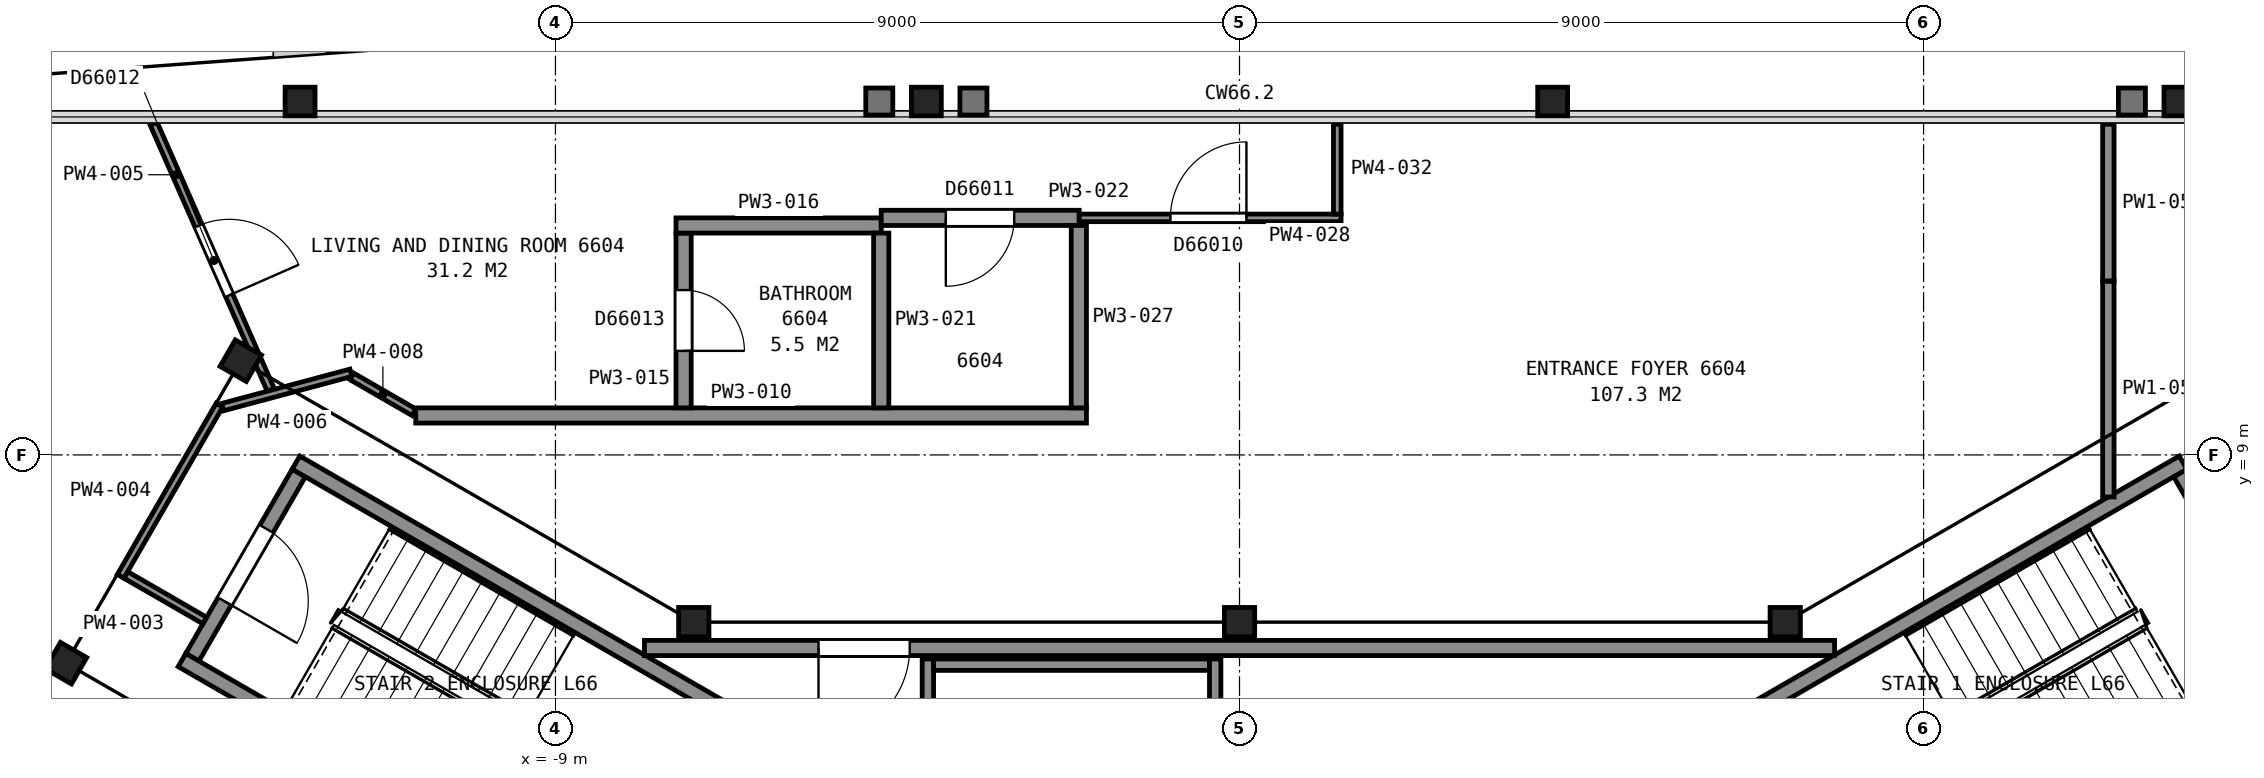
"""IFC4 building model, lengths in metres.
Left out: names, types, materials, properties, quantities, classifications, styles, units other than length and angle.
Written with IfcOpenShell. Run it as: python <this file> out.ifc"""

import sys

from ifc_helpers import new_model, si_unit, direction, frame, frame_2d, origin, origin_2d, place, context, subcontext, project, spatial, rectangle, i_section, extrude, element, fill, save


model = new_model("IFC4")
c1 = context("Model", 3, precision=1e-05, world=origin(), true_north=direction((0.0, 1.0)))
c2 = subcontext(c1, "Body", "Model", "MODEL_VIEW")
j1 = project(units=[si_unit("LENGTHUNIT", "METRE"), si_unit("PLANEANGLEUNIT", "RADIAN")], contexts=[c1])
p1 = place(None, origin())
s1 = spatial("IfcSite", under=j1, at=p1, CompositionType="ELEMENT")
p2 = place(p1, origin())
s2 = spatial("IfcBuilding", under=s1, at=p2, CompositionType="ELEMENT")
p3 = place(p2, frame((0.0, 0.0, 264.0)))
s3 = spatial("IfcBuildingStorey", under=s2, at=p3, CompositionType="ELEMENT", Elevation=264.0)
for number, where, z_axis, x_axis in (
    (1, (12.36, 13.65, 0.0), (0.0, 0.0, 1.0), (1.0, 0.0, 0.0)),
    (2, (4.12, 13.65, 0.0), (0.0, 0.0, 1.0), (1.0, 0.0, 0.0)),
    (3, (-4.12, 13.65, 0.0), (0.0, 0.0, 1.0), (1.0, 0.0, 0.0)),
    (4, (-12.36, 13.65, 0.0), (0.0, 0.0, 1.0), (1.0, 0.0, 0.0)),
):
    element("IfcColumn", number, at=place(p3, frame(where, z_axis=z_axis, x_axis=x_axis)), inside=s3, PredefinedType="COLUMN", context=c2, shape_type="SweptSolid", body=[
        extrude(i_section(OverallWidth=0.394, OverallDepth=0.376, WebThickness=0.017, FlangeThickness=0.028, FilletRadius=0.015, at=origin_2d()), origin(), (0.0, 0.0, 1.0), 3.7),
    ])
p4 = place(p3, frame((7.18, 6.8, 0.065), z_axis=(0.0, 0.0, 1.0), x_axis=(1.0, 0.0, 0.0)))
e5 = element("IfcColumn", 5, at=p4, inside=s3, PredefinedType="COLUMN", context=c2, shape_type="SweptSolid", body=[
    extrude(i_section(OverallWidth=0.399, OverallDepth=0.386, WebThickness=0.021, FlangeThickness=0.033, FilletRadius=0.015, at=origin_2d()), origin(), (0.0, 0.0, 1.0), 3.635),
])
p5 = place(p3, frame((0.0, 6.8, 0.03), z_axis=(0.0, 0.0, 1.0), x_axis=(1.0, 0.0, 0.0)))
e6 = element("IfcColumn", 6, at=p5, inside=s3, PredefinedType="COLUMN", context=c2, shape_type="SweptSolid", body=[
    extrude(i_section(OverallWidth=0.399, OverallDepth=0.386, WebThickness=0.021, FlangeThickness=0.033, FilletRadius=0.015, at=origin_2d()), origin(), (0.0, 0.0, 1.0), 3.67),
])
p6 = place(p3, frame((-7.18, 6.8, 0.065), z_axis=(0.0, 0.0, 1.0), x_axis=(1.0, 0.0, 0.0)))
e7 = element("IfcColumn", 7, at=p6, inside=s3, PredefinedType="COLUMN", context=c2, shape_type="SweptSolid", body=[
    extrude(i_section(OverallWidth=0.399, OverallDepth=0.386, WebThickness=0.021, FlangeThickness=0.033, FilletRadius=0.015, at=origin_2d()), origin(), (0.0, 0.0, 1.0), 3.635),
])
for number, where, z_axis, x_axis in (
    (8, (-13.14, 10.24, 0.05), (0.0, 0.0, 1.0), (0.5, 0.866, 0.0)),
    (9, (-15.44, 6.26, 0.05), (0.0, 0.0, 1.0), (0.5, 0.866, 0.0)),
):
    element("IfcColumn", number, at=place(p3, frame(where, z_axis=z_axis, x_axis=x_axis)), inside=s3, PredefinedType="COLUMN", context=c2, shape_type="SweptSolid", body=[
        extrude(i_section(OverallWidth=0.401, OverallDepth=0.399, WebThickness=0.025, FlangeThickness=0.04, FilletRadius=0.015, at=origin_2d()), origin(), (0.0, 0.0, 1.0), 3.65),
    ])
p7 = place(p3, frame((13.777, 6.338, 0.0), z_axis=(0.0, 0.0, 1.0), x_axis=(-0.500049511043, 0.865996816683, 0.0)))
e10 = element("IfcWall", 10, at=p7, inside=s3, PredefinedType="PARTITIONING", context=c2, shape_type="SweptSolid", body=[
    extrude(rectangle(XDim=2.8, YDim=0.2, at=frame_2d((1.4, 0.0))), origin(), (0.0, 0.0, 1.0), 3.45),
])
p8 = place(p7, frame((0.85, 0.0, 0.0)))
e11 = element("IfcOpeningElement", 11, at=p8, cuts=e10, PredefinedType="OPENING", context=c2, shape_type="SweptSolid", body=[
    extrude(rectangle(XDim=1.1, YDim=2.1, at=frame_2d((0.55, 1.05))), frame((0.0, 0.11, 0.0), z_axis=(0.0, -1.0, 0.0), x_axis=(1.0, 0.0, 0.0)), (0.0, 0.0, 1.0), 0.22),
])
for number, where, z_axis, x_axis in (
    (12, (6.178, 5.299, 0.0), (0.0, 0.0, 1.0), (0.866, 0.5, 0.0)),
    (13, (7.678, 2.701, 0.0), (0.0, 0.0, 1.0), (0.866, 0.5, 0.0)),
):
    element("IfcWall", number, at=place(p3, frame(where, z_axis=z_axis, x_axis=x_axis)), inside=s3, PredefinedType="PARTITIONING", context=c2, shape_type="SweptSolid", body=[
        extrude(rectangle(XDim=7.2, YDim=0.2, at=frame_2d((3.6, 0.0))), origin(), (0.0, 0.0, 1.0), 3.45),
    ])
p9 = place(p3, frame((-12.377, 8.762, 0.0), z_axis=(0.0, 0.0, 1.0), x_axis=(-0.500049511043, -0.865996816683, 0.0)))
e14 = element("IfcWall", 14, at=p9, inside=s3, PredefinedType="PARTITIONING", context=c2, shape_type="SweptSolid", body=[
    extrude(rectangle(XDim=2.8, YDim=0.2, at=frame_2d((1.4, 0.0))), origin(), (0.0, 0.0, 1.0), 3.45),
])
p10 = place(p9, frame((0.85, 0.0, 0.0)))
e15 = element("IfcOpeningElement", 15, at=p10, cuts=e14, PredefinedType="OPENING", context=c2, shape_type="SweptSolid", body=[
    extrude(rectangle(XDim=1.1, YDim=2.1, at=frame_2d((0.55, 1.05))), frame((0.0, 0.11, 0.0), z_axis=(0.0, -1.0, 0.0), x_axis=(1.0, 0.0, 0.0)), (0.0, 0.0, 1.0), 0.22),
])
for number, where, z_axis, x_axis in (
    (16, (-7.678, 2.701, 0.0), (0.0, 0.0, 1.0), (-0.866, 0.5, 0.0)),
    (17, (-6.178, 5.299, 0.0), (0.0, 0.0, 1.0), (-0.866, 0.5, 0.0)),
):
    element("IfcWall", number, at=place(p3, frame(where, z_axis=z_axis, x_axis=x_axis)), inside=s3, PredefinedType="PARTITIONING", context=c2, shape_type="SweptSolid", body=[
        extrude(rectangle(XDim=7.2, YDim=0.2, at=frame_2d((3.6, 0.0))), origin(), (0.0, 0.0, 1.0), 3.45),
    ])
p11 = place(p3, frame((7.829, 6.46, 0.0), z_axis=(0.0, 0.0, 1.0), x_axis=(-1.0, 0.0, 0.0)))
e18 = element("IfcWall", 18, at=p11, inside=s3, PredefinedType="PARTITIONING", context=c2, shape_type="SweptSolid", body=[
    extrude(rectangle(XDim=15.658, YDim=0.2, at=frame_2d((7.829, 0.0))), origin(), (0.0, 0.0, 1.0), 3.45),
])
p12 = place(p11, frame((12.168, 0.0, 0.0)))
e19 = element("IfcOpeningElement", 19, at=p12, cuts=e18, PredefinedType="OPENING", context=c2, shape_type="SweptSolid", body=[
    extrude(rectangle(XDim=1.2, YDim=2.1, at=frame_2d((0.6, 1.05))), frame((0.0, 0.11, 0.0), z_axis=(0.0, -1.0, 0.0), x_axis=(1.0, 0.0, 0.0)), (0.0, 0.0, 1.0), 0.22),
])
p13 = place(p3, frame((-4.1, 2.085, 0.0), z_axis=(0.0, 0.0, 1.0), x_axis=(0.0, 1.0, 0.0)))
e20 = element("IfcWall", 20, at=p13, inside=s3, PredefinedType="PARTITIONING", context=c2, shape_type="SweptSolid", body=[
    extrude(rectangle(XDim=4.23, YDim=0.15, at=frame_2d((2.115, 0.0))), origin(), (0.0, 0.0, 1.0), 3.45),
])
p14 = place(p13, frame((1.625, 0.0, 0.0)))
e21 = element("IfcOpeningElement", 21, at=p14, cuts=e20, PredefinedType="OPENING", context=c2, shape_type="SweptSolid", body=[
    extrude(rectangle(XDim=1.0, YDim=2.1, at=frame_2d((0.5, 1.05))), frame((0.0, 0.085, 0.0), z_axis=(0.0, -1.0, 0.0), x_axis=(1.0, 0.0, 0.0)), (0.0, 0.0, 1.0), 0.17),
])
p15 = place(p3, frame((-4.025, 6.24, 0.0), z_axis=(0.0, 0.0, 1.0), x_axis=(1.0, 0.0, 0.0)))
e22 = element("IfcWall", 22, at=p15, inside=s3, PredefinedType="PARTITIONING", context=c2, shape_type="SweptSolid", body=[
    extrude(rectangle(XDim=3.63, YDim=0.15, at=frame_2d((1.815, 0.0))), origin(), (0.0, 0.0, 1.0), 3.45),
])
p16 = place(p3, frame((-0.32, 2.252, 0.0), z_axis=(0.0, 0.0, 1.0), x_axis=(0.0, 1.0, 0.0)))
e23 = element("IfcWall", 23, at=p16, inside=s3, PredefinedType="PARTITIONING", context=c2, shape_type="SweptSolid", body=[
    extrude(rectangle(XDim=4.063, YDim=0.15, at=frame_2d((2.031, 0.0))), origin(), (0.0, 0.0, 1.0), 3.45),
])
p17 = place(p3, frame((-14.653, 7.421, 0.0), z_axis=(0.0, 0.0, 1.0), x_axis=(0.865941482684, -0.500145327446, 0.0)))
e24 = element("IfcWall", 24, at=p17, inside=s3, PredefinedType="PARTITIONING", context=c2, shape_type="SweptSolid", body=[
    extrude(rectangle(XDim=1.199, YDim=0.1, at=frame_2d((0.6, 0.0))), origin(), (0.0, 0.0, 1.0), 2.723),
])
p18 = place(p3, frame((-14.721, 7.403, 0.0), z_axis=(0.0, 0.0, 1.0), x_axis=(0.500006934395, 0.866021400173, 0.0)))
e25 = element("IfcWall", 25, at=p18, inside=s3, PredefinedType="PARTITIONING", context=c2, shape_type="SweptSolid", body=[
    extrude(rectangle(XDim=2.6, YDim=0.1, at=frame_2d((1.3, 0.0))), origin(), (0.0, 0.0, 1.0), 2.723),
])
p19 = place(p3, frame((-12.747, 9.857, 0.0), z_axis=(0.0, 0.0, 1.0), x_axis=(-0.402509649346, 0.91541574281, 0.0)))
e26 = element("IfcWall", 26, at=p19, inside=s3, PredefinedType="PARTITIONING", context=c2, shape_type="SweptSolid", body=[
    extrude(rectangle(XDim=3.824, YDim=0.1, at=frame_2d((1.912, 0.0))), origin(), (0.0, 0.0, 1.0), 2.723),
])
p20 = place(p19, frame((1.357, 0.0, 0.0)))
e27 = element("IfcOpeningElement", 27, at=p20, cuts=e26, PredefinedType="OPENING", context=c2, shape_type="SweptSolid", body=[
    extrude(rectangle(XDim=1.0, YDim=2.1, at=frame_2d((0.5, 1.05))), frame((0.0, 0.06, 0.0), z_axis=(0.0, -1.0, 0.0), x_axis=(1.0, 0.0, 0.0)), (0.0, 0.0, 1.0), 0.12),
])
p21 = place(p3, frame((-13.378, 9.629, 0.0), z_axis=(0.0, 0.0, 1.0), x_axis=(0.966007272337, 0.258514892785, 0.0)))
e28 = element("IfcWall", 28, at=p21, inside=s3, PredefinedType="PARTITIONING", context=c2, shape_type="SweptSolid", body=[
    extrude(rectangle(XDim=1.747, YDim=0.1, at=frame_2d((0.874, 0.0))), origin(), (0.0, 0.0, 1.0), 2.723),
])
p22 = place(p3, frame((-11.678, 10.033, 0.0), z_axis=(0.0, 0.0, 1.0), x_axis=(0.866116627388, -0.499841962787, 0.0)))
e29 = element("IfcWall", 29, at=p22, inside=s3, PredefinedType="PARTITIONING", context=c2, shape_type="SweptSolid", body=[
    extrude(rectangle(XDim=0.943, YDim=0.1, at=frame_2d((0.472, 0.0))), origin(), (0.0, 0.0, 1.0), 2.723),
])
p23 = place(p3, frame((-10.838, 9.519, 0.0), z_axis=(0.0, 0.0, 1.0), x_axis=(1.0, 0.0, 0.0)))
e30 = element("IfcWall", 30, at=p23, inside=s3, PredefinedType="PARTITIONING", context=c2, shape_type="SweptSolid", body=[
    extrude(rectangle(XDim=8.824, YDim=0.2, at=frame_2d((4.412, 0.0))), origin(), (0.0, 0.0, 1.0), 2.723),
])
p24 = place(p3, frame((-7.314, 11.919, 0.0), z_axis=(0.0, 0.0, 1.0), x_axis=(0.0, -1.0, 0.0)))
e31 = element("IfcWall", 31, at=p24, inside=s3, PredefinedType="PARTITIONING", context=c2, shape_type="SweptSolid", body=[
    extrude(rectangle(XDim=2.3, YDim=0.2, at=frame_2d((1.15, 0.0))), origin(), (0.0, 0.0, 1.0), 2.723),
])
p25 = place(p24, frame((0.75, 0.0, 0.0)))
e32 = element("IfcOpeningElement", 32, at=p25, cuts=e31, PredefinedType="OPENING", context=c2, shape_type="SweptSolid", body=[
    extrude(rectangle(XDim=0.8, YDim=2.1, at=frame_2d((0.4, 1.05))), frame((0.0, 0.11, 0.0), z_axis=(0.0, -1.0, 0.0), x_axis=(1.0, 0.0, 0.0)), (0.0, 0.0, 1.0), 0.22),
])
p26 = place(p3, frame((-7.414, 12.019, 0.0), z_axis=(0.0, 0.0, 1.0), x_axis=(1.0, 0.0, 0.0)))
e33 = element("IfcWall", 33, at=p26, inside=s3, PredefinedType="PARTITIONING", context=c2, shape_type="SweptSolid", body=[
    extrude(rectangle(XDim=2.7, YDim=0.2, at=frame_2d((1.35, 0.0))), origin(), (0.0, 0.0, 1.0), 2.723),
])
p27 = place(p3, frame((-4.714, 9.619, 0.0), z_axis=(0.0, 0.0, 1.0), x_axis=(0.0, 1.0, 0.0)))
e34 = element("IfcWall", 34, at=p27, inside=s3, PredefinedType="PARTITIONING", context=c2, shape_type="SweptSolid", body=[
    extrude(rectangle(XDim=2.3, YDim=0.2, at=frame_2d((1.15, 0.0))), origin(), (0.0, 0.0, 1.0), 2.723),
])
p28 = place(p3, frame((-2.109, 12.119, 0.0), z_axis=(0.0, 0.0, 1.0), x_axis=(-1.0, 0.0, 0.0)))
e35 = element("IfcWall", 35, at=p28, inside=s3, PredefinedType="PARTITIONING", context=c2, shape_type="SweptSolid", body=[
    extrude(rectangle(XDim=2.605, YDim=0.2, at=frame_2d((1.303, 0.0))), origin(), (0.0, 0.0, 1.0), 2.723),
])
p29 = place(p28, frame((0.855, 0.0, 0.0)))
e36 = element("IfcOpeningElement", 36, at=p29, cuts=e35, PredefinedType="OPENING", context=c2, shape_type="SweptSolid", body=[
    extrude(rectangle(XDim=0.9, YDim=2.1, at=frame_2d((0.45, 1.05))), frame((0.0, 0.11, 0.0), z_axis=(0.0, -1.0, 0.0), x_axis=(1.0, 0.0, 0.0)), (0.0, 0.0, 1.0), 0.22),
])
p30 = place(p3, frame((-2.114, 9.619, 0.0), z_axis=(0.0, 0.0, 1.0), x_axis=(0.0, 1.0, 0.0)))
e37 = element("IfcWall", 37, at=p30, inside=s3, PredefinedType="PARTITIONING", context=c2, shape_type="SweptSolid", body=[
    extrude(rectangle(XDim=2.4, YDim=0.2, at=frame_2d((1.2, 0.0))), origin(), (0.0, 0.0, 1.0), 2.723),
])
p31 = place(p3, frame((-2.109, 12.119, 0.0), z_axis=(0.0, 0.0, 1.0), x_axis=(1.0, 0.0, 0.0)))
e38 = element("IfcWall", 38, at=p31, inside=s3, PredefinedType="PARTITIONING", context=c2, shape_type="SweptSolid", body=[
    extrude(rectangle(XDim=3.445, YDim=0.1, at=frame_2d((1.722, 0.0))), origin(), (0.0, 0.0, 1.0), 2.723),
])
p32 = place(p31, frame((1.2, 0.0, 0.0)))
e39 = element("IfcOpeningElement", 39, at=p32, cuts=e38, PredefinedType="OPENING", context=c2, shape_type="SweptSolid", body=[
    extrude(rectangle(XDim=1.0, YDim=2.1, at=frame_2d((0.5, 1.05))), frame((0.0, 0.06, 0.0), z_axis=(0.0, -1.0, 0.0), x_axis=(1.0, 0.0, 0.0)), (0.0, 0.0, 1.0), 0.12),
])
p33 = place(p3, frame((1.286, 12.169, 0.0), z_axis=(0.0, 0.0, 1.0), x_axis=(0.0, 1.0, 0.0)))
e40 = element("IfcWall", 40, at=p33, inside=s3, PredefinedType="PARTITIONING", context=c2, shape_type="SweptSolid", body=[
    extrude(rectangle(XDim=1.182, YDim=0.1, at=frame_2d((0.591, 0.0))), origin(), (0.0, 0.0, 1.0), 2.723),
])
p34 = place(p3, frame((11.431, 8.447, 0.0), z_axis=(0.0, 0.0, 1.0), x_axis=(0.0, 1.0, 0.0)))
e41 = element("IfcWall", 41, at=p34, inside=s3, PredefinedType="PARTITIONING", context=c2, shape_type="SweptSolid", body=[
    extrude(rectangle(XDim=2.838, YDim=0.15, at=frame_2d((1.419, 0.0))), origin(), (0.0, 0.0, 1.0), 2.723),
])
p35 = place(p3, frame((11.431, 11.29, 0.0), z_axis=(0.0, 0.0, 1.0), x_axis=(0.0, 1.0, 0.0)))
e42 = element("IfcWall", 42, at=p35, inside=s3, PredefinedType="PARTITIONING", context=c2, shape_type="SweptSolid", body=[
    extrude(rectangle(XDim=2.061, YDim=0.15, at=frame_2d((1.031, 0.0))), origin(), (0.0, 0.0, 1.0), 2.723),
])
p36 = place(p10, origin())
e43 = element("IfcDoor", 43, at=p36, inside=s3, OperationType="SINGLE_SWING_RIGHT", PredefinedType="DOOR", context=c2, shape_type="SweptSolid", body=[
    extrude(rectangle(XDim=1.1, YDim=2.1, at=frame_2d((0.55, 1.05))), frame((0.0, 0.025, 0.0), z_axis=(0.0, -1.0, 0.0), x_axis=(1.0, 0.0, 0.0)), (0.0, 0.0, 1.0), 0.05),
])
fill(e15, e43)
p37 = place(p12, origin())
e44 = element("IfcDoor", 44, at=p37, inside=s3, OperationType="SINGLE_SWING_RIGHT", PredefinedType="DOOR", context=c2, shape_type="SweptSolid", body=[
    extrude(rectangle(XDim=1.2, YDim=2.1, at=frame_2d((0.6, 1.05))), frame((0.0, 0.025, 0.0), z_axis=(0.0, -1.0, 0.0), x_axis=(1.0, 0.0, 0.0)), (0.0, 0.0, 1.0), 0.05),
])
fill(e19, e44)
p38 = place(p20, origin())
e45 = element("IfcDoor", 45, at=p38, inside=s3, OperationType="SINGLE_SWING_LEFT", PredefinedType="DOOR", context=c2, shape_type="SweptSolid", body=[
    extrude(rectangle(XDim=1.0, YDim=2.1, at=frame_2d((0.5, 1.05))), frame((0.0, 0.025, 0.0), z_axis=(0.0, -1.0, 0.0), x_axis=(1.0, 0.0, 0.0)), (0.0, 0.0, 1.0), 0.05),
])
fill(e27, e45)
p39 = place(p25, origin())
e46 = element("IfcDoor", 46, at=p39, inside=s3, OperationType="SINGLE_SWING_RIGHT", PredefinedType="DOOR", context=c2, shape_type="SweptSolid", body=[
    extrude(rectangle(XDim=0.8, YDim=2.1, at=frame_2d((0.4, 1.05))), frame((0.0, 0.025, 0.0), z_axis=(0.0, -1.0, 0.0), x_axis=(1.0, 0.0, 0.0)), (0.0, 0.0, 1.0), 0.05),
])
fill(e32, e46)
p40 = place(p29, origin())
e47 = element("IfcDoor", 47, at=p40, inside=s3, OperationType="SINGLE_SWING_RIGHT", PredefinedType="DOOR", context=c2, shape_type="SweptSolid", body=[
    extrude(rectangle(XDim=0.9, YDim=2.1, at=frame_2d((0.45, 1.05))), frame((0.0, 0.025, 0.0), z_axis=(0.0, -1.0, 0.0), x_axis=(1.0, 0.0, 0.0)), (0.0, 0.0, 1.0), 0.05),
])
fill(e36, e47)
p41 = place(p32, origin())
e48 = element("IfcDoor", 48, at=p41, inside=s3, OperationType="SINGLE_SWING_RIGHT", PredefinedType="DOOR", context=c2, shape_type="SweptSolid", body=[
    extrude(rectangle(XDim=1.0, YDim=2.1, at=frame_2d((0.5, 1.05))), frame((0.0, 0.025, 0.0), z_axis=(0.0, -1.0, 0.0), x_axis=(1.0, 0.0, 0.0)), (0.0, 0.0, 1.0), 0.05),
])
fill(e39, e48)
save(model, sys.argv[1])
